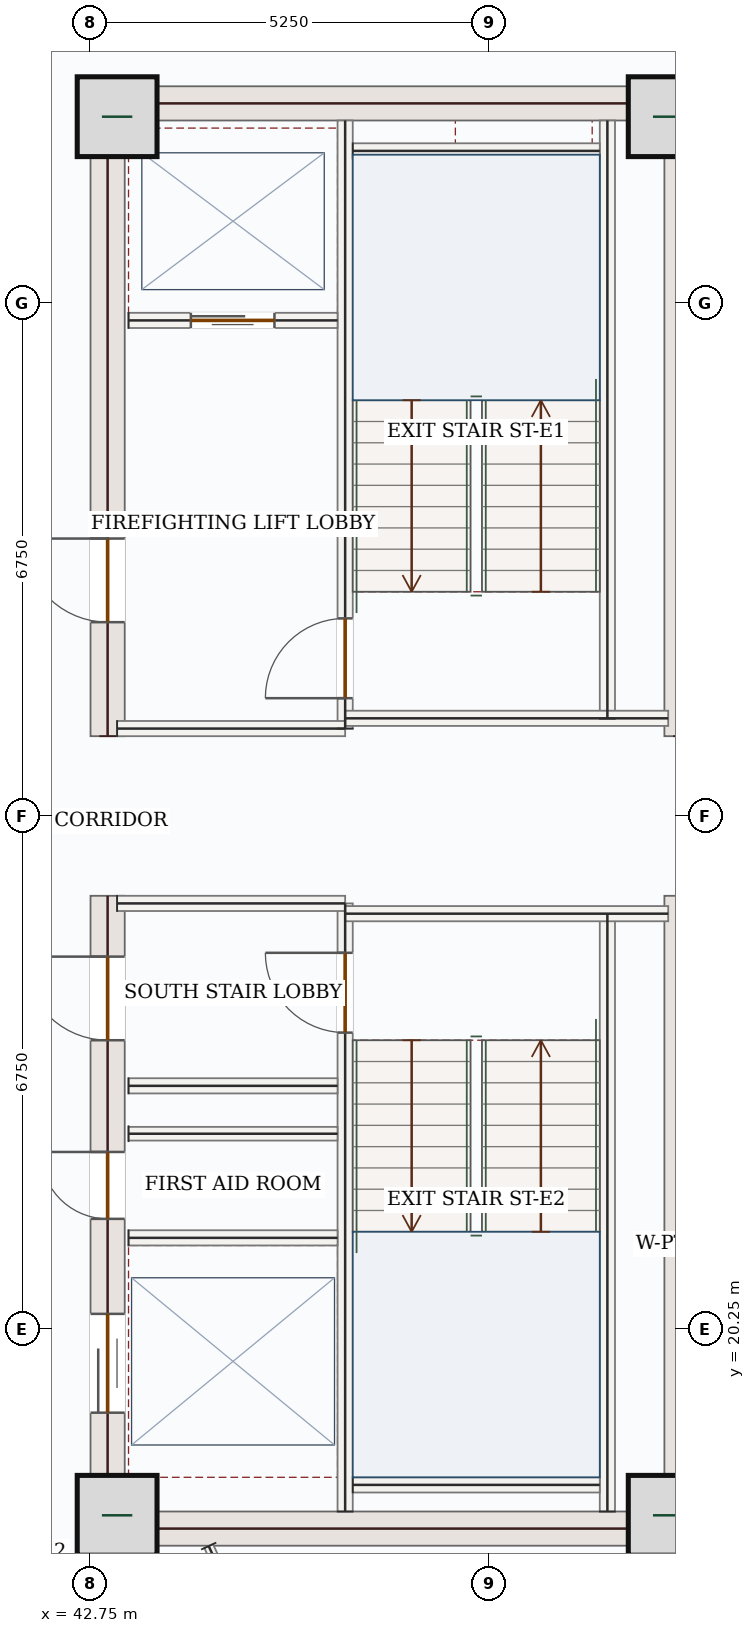
"""IFC4 building model, lengths in metres.
Left out: names, types, materials, properties, quantities, classifications, styles, units other than length and angle.
Written with IfcOpenShell. Run it as: python <this file> out.ifc"""

import sys

from ifc_helpers import new_model, si_unit, direction, frame, frame_2d, origin, origin_2d, place, context, subcontext, project, spatial, rectangle, extrude, source, transform, mapped, element, fill, save


model = new_model("IFC4")
c1 = context("Model", 3, precision=1e-05, world=origin(), true_north=direction((0.0, 1.0)))
c2 = subcontext(c1, "Body", "Model", "MODEL_VIEW")
j1 = project(units=[si_unit("LENGTHUNIT", "METRE"), si_unit("PLANEANGLEUNIT", "RADIAN")], contexts=[c1])
p1 = place(None, origin())
s1 = spatial("IfcSite", under=j1, at=p1, CompositionType="ELEMENT")
p2 = place(p1, origin())
s2 = spatial("IfcBuilding", under=s1, at=p2, CompositionType="ELEMENT")
p3 = place(p2, frame((0.0, 0.0, 239.1)))
s3 = spatial("IfcBuildingStorey", under=s2, at=p3, CompositionType="ELEMENT", Elevation=239.1)
p4 = place(p3, frame((42.975, 17.4, 0.0), z_axis=(0.0, 0.0, 1.0), x_axis=(0.0, 1.0, 0.0)))
e1 = element("IfcWall", 1, at=p4, inside=s3, PredefinedType="SHEAR", context=c2, shape_type="SweptSolid", body=[
    extrude(rectangle(XDim=8.55, YDim=0.45, at=frame_2d((4.275, 0.0))), origin(), (0.0, 0.0, 1.0), 3.5),
])
p5 = place(p4, frame((6.65, 0.0, 0.0)))
e2 = element("IfcOpeningElement", 2, at=p5, cuts=e1, PredefinedType="OPENING", context=c2, shape_type="SweptSolid", body=[
    extrude(rectangle(XDim=1.1, YDim=2.2, at=frame_2d((0.55, 1.1))), frame((0.0, 0.235, 0.0), z_axis=(0.0, -1.0, 0.0), x_axis=(1.0, 0.0, 0.0)), (0.0, 0.0, 1.0), 0.47),
])
p6 = place(p4, frame((1.75, 0.0, 0.0)))
e3 = element("IfcOpeningElement", 3, at=p6, cuts=e1, PredefinedType="OPENING", context=c2, shape_type="SweptSolid", body=[
    extrude(rectangle(XDim=1.3, YDim=2.2, at=frame_2d((0.65, 1.1))), frame((0.0, 0.235, 0.0), z_axis=(0.0, -1.0, 0.0), x_axis=(1.0, 0.0, 0.0)), (0.0, 0.0, 1.0), 0.47),
])
p7 = place(p4, frame((4.3, 0.0, 0.0)))
e4 = element("IfcOpeningElement", 4, at=p7, cuts=e1, PredefinedType="OPENING", context=c2, shape_type="SweptSolid", body=[
    extrude(rectangle(XDim=0.88, YDim=2.1, at=frame_2d((0.44, 1.05))), frame((0.0, 0.235, 0.0), z_axis=(0.0, -1.0, 0.0), x_axis=(1.0, 0.0, 0.0)), (0.0, 0.0, 1.0), 0.47),
])
p8 = place(p3, frame((42.975, 28.05, 0.0), z_axis=(0.0, 0.0, 1.0), x_axis=(0.0, 1.0, 0.0)))
e5 = element("IfcWall", 5, at=p8, inside=s3, PredefinedType="SHEAR", context=c2, shape_type="SweptSolid", body=[
    extrude(rectangle(XDim=8.55, YDim=0.45, at=frame_2d((4.275, 0.0))), origin(), (0.0, 0.0, 1.0), 3.5),
])
p9 = place(p8, frame((1.5, 0.0, 0.0)))
e6 = element("IfcOpeningElement", 6, at=p9, cuts=e5, PredefinedType="OPENING", context=c2, shape_type="SweptSolid", body=[
    extrude(rectangle(XDim=1.1, YDim=2.2, at=frame_2d((0.55, 1.1))), frame((0.0, 0.235, 0.0), z_axis=(0.0, -1.0, 0.0), x_axis=(1.0, 0.0, 0.0)), (0.0, 0.0, 1.0), 0.47),
])
m1 = source(origin(), c2, "Body", "SweptSolid", [
    extrude(rectangle(XDim=8.55, YDim=0.45, at=frame_2d((4.275, 0.0))), origin(), (0.0, 0.0, 1.0), 3.5),
])
for number, where, z_axis, x_axis in (
    (7, (50.525, 17.4, 0.0), (0.0, 0.0, 1.0), (0.0, 1.0, 0.0)),
    (8, (50.525, 28.05, 0.0), (0.0, 0.0, 1.0), (0.0, 1.0, 0.0)),
):
    element("IfcWall", number, at=place(p3, frame(where, z_axis=z_axis, x_axis=x_axis)), inside=s3, PredefinedType="SHEAR", context=c2, shape_type="MappedRepresentation", body=[
        mapped(m1, transform((0.0, 0.0, 0.0), x_axis=(1.0, 0.0, 0.0), y_axis=(0.0, 1.0, 0.0), z_axis=(0.0, 0.0, 1.0), scale=1.0)),
    ])
m2 = source(origin(), c2, "Body", "SweptSolid", [
    extrude(rectangle(XDim=7.1, YDim=0.45, at=frame_2d((3.55, 0.0))), origin(), (0.0, 0.0, 1.0), 3.5),
])
for number, where, z_axis, x_axis in (
    (9, (43.2, 17.625, 0.0), (0.0, 0.0, 1.0), (1.0, 0.0, 0.0)),
    (10, (43.2, 36.375, 0.0), (0.0, 0.0, 1.0), (1.0, 0.0, 0.0)),
):
    element("IfcWall", number, at=place(p3, frame(where, z_axis=z_axis, x_axis=x_axis)), inside=s3, PredefinedType="SHEAR", context=c2, shape_type="MappedRepresentation", body=[
        mapped(m2, transform((0.0, 0.0, 0.0), x_axis=(1.0, 0.0, 0.0), y_axis=(0.0, 1.0, 0.0), z_axis=(0.0, 0.0, 1.0), scale=1.0)),
    ])
m3 = source(origin(), c2, "Body", "SweptSolid", [
    extrude(rectangle(XDim=1.05, YDim=1.05, at=origin_2d()), origin(), (0.0, 0.0, 1.0), 3.75),
])
for number, where, z_axis, x_axis in (
    (11, (43.1, 17.8, 0.0), (0.0, 0.0, 1.0), (1.0, 0.0, 0.0)),
    (12, (50.35, 17.8, 0.0), (0.0, 0.0, 1.0), (1.0, 0.0, 0.0)),
    (13, (43.1, 36.2, 0.0), (0.0, 0.0, 1.0), (1.0, 0.0, 0.0)),
    (14, (50.35, 36.2, 0.0), (0.0, 0.0, 1.0), (1.0, 0.0, 0.0)),
):
    element("IfcColumn", number, at=place(p3, frame(where, z_axis=z_axis, x_axis=x_axis)), inside=s3, PredefinedType="COLUMN", context=c2, shape_type="MappedRepresentation", body=[
        mapped(m3, transform((0.0, 0.0, 0.0), x_axis=(1.0, 0.0, 0.0), y_axis=(0.0, 1.0, 0.0), z_axis=(0.0, 0.0, 1.0), scale=1.0)),
    ])
p10 = place(p3, frame((53.06, 18.458, 0.0), z_axis=(0.0, 0.0, 1.0), x_axis=(-0.707106781187, -0.707106781187, 0.0)))
e15 = element("IfcWall", 15, at=p10, inside=s3, PredefinedType="SOLIDWALL", context=c2, shape_type="SweptSolid", body=[
    extrude(rectangle(XDim=5.258, YDim=0.28, at=frame_2d((2.629, 0.0))), origin(), (0.0, 0.0, 1.0), 3.5),
])
p11 = place(p10, frame((1.879, 0.0, 0.85)))
e16 = element("IfcOpeningElement", 16, at=p11, cuts=e15, PredefinedType="OPENING", context=c2, shape_type="SweptSolid", body=[
    extrude(rectangle(XDim=1.5, YDim=1.5, at=frame_2d((0.75, 0.75))), frame((0.0, 0.15, 0.0), z_axis=(0.0, -1.0, 0.0), x_axis=(1.0, 0.0, 0.0)), (0.0, 0.0, 1.0), 0.3),
])
m4 = source(origin(), c2, "Body", "SweptSolid", [
    extrude(rectangle(XDim=7.87, YDim=0.2, at=frame_2d((3.935, 0.0))), origin(), (0.0, 0.0, 1.0), 3.5),
])
for number, where, z_axis, x_axis in (
    (17, (49.55, 17.85, 0.0), (0.0, 0.0, 1.0), (0.0, 1.0, 0.0)),
    (18, (49.55, 28.28, 0.0), (0.0, 0.0, 1.0), (0.0, 1.0, 0.0)),
):
    element("IfcWall", number, at=place(p3, frame(where, z_axis=z_axis, x_axis=x_axis)), inside=s3, PredefinedType="SOLIDWALL", context=c2, shape_type="MappedRepresentation", body=[
        mapped(m4, transform((0.0, 0.0, 0.0), x_axis=(1.0, 0.0, 0.0), y_axis=(0.0, 1.0, 0.0), z_axis=(0.0, 0.0, 1.0), scale=1.0)),
    ])
p12 = place(p3, frame((46.1, 17.85, 0.0), z_axis=(0.0, 0.0, 1.0), x_axis=(0.0, 1.0, 0.0)))
e19 = element("IfcWall", 19, at=p12, inside=s3, PredefinedType="SOLIDWALL", context=c2, shape_type="SweptSolid", body=[
    extrude(rectangle(XDim=8.0, YDim=0.2, at=frame_2d((4.0, 0.0))), origin(), (0.0, 0.0, 1.0), 3.5),
])
p13 = place(p12, frame((6.3, 0.0, 0.0)))
e20 = element("IfcOpeningElement", 20, at=p13, cuts=e19, PredefinedType="OPENING", context=c2, shape_type="SweptSolid", body=[
    extrude(rectangle(XDim=1.05, YDim=2.15, at=frame_2d((0.525, 1.075))), frame((0.0, 0.11, 0.0), z_axis=(0.0, -1.0, 0.0), x_axis=(1.0, 0.0, 0.0)), (0.0, 0.0, 1.0), 0.22),
])
p14 = place(p3, frame((46.1, 28.15, 0.0), z_axis=(0.0, 0.0, 1.0), x_axis=(0.0, 1.0, 0.0)))
e21 = element("IfcWall", 21, at=p14, inside=s3, PredefinedType="SOLIDWALL", context=c2, shape_type="SweptSolid", body=[
    extrude(rectangle(XDim=8.0, YDim=0.2, at=frame_2d((4.0, 0.0))), origin(), (0.0, 0.0, 1.0), 3.5),
])
p15 = place(p14, frame((0.4, 0.0, 0.0)))
e22 = element("IfcOpeningElement", 22, at=p15, cuts=e21, PredefinedType="OPENING", context=c2, shape_type="SweptSolid", body=[
    extrude(rectangle(XDim=1.05, YDim=2.15, at=frame_2d((0.525, 1.075))), frame((0.0, 0.11, 0.0), z_axis=(0.0, -1.0, 0.0), x_axis=(1.0, 0.0, 0.0)), (0.0, 0.0, 1.0), 0.22),
])
m5 = source(origin(), c2, "Body", "SweptSolid", [
    extrude(rectangle(XDim=3.0, YDim=0.2, at=frame_2d((1.5, 0.0))), origin(), (0.0, 0.0, 1.0), 3.5),
])
p16 = place(p3, frame((43.1, 25.85, 0.0), z_axis=(0.0, 0.0, 1.0), x_axis=(1.0, 0.0, 0.0)))
e23 = element("IfcWall", 23, at=p16, inside=s3, PredefinedType="SOLIDWALL", context=c2, shape_type="MappedRepresentation", body=[
    mapped(m5, transform((0.0, 0.0, 0.0), x_axis=(1.0, 0.0, 0.0), y_axis=(0.0, 1.0, 0.0), z_axis=(0.0, 0.0, 1.0), scale=1.0)),
])
m6 = source(origin(), c2, "Body", "SweptSolid", [
    extrude(rectangle(XDim=4.25, YDim=0.2, at=frame_2d((2.125, 0.0))), origin(), (0.0, 0.0, 1.0), 3.5),
])
p17 = place(p3, frame((46.1, 25.715, 0.0), z_axis=(0.0, 0.0, 1.0), x_axis=(1.0, 0.0, 0.0)))
e24 = element("IfcWall", 24, at=p17, inside=s3, PredefinedType="SOLIDWALL", context=c2, shape_type="MappedRepresentation", body=[
    mapped(m6, transform((0.0, 0.0, 0.0), x_axis=(1.0, 0.0, 0.0), y_axis=(0.0, 1.0, 0.0), z_axis=(0.0, 0.0, 1.0), scale=1.0)),
])
p18 = place(p3, frame((43.1, 28.15, 0.0), z_axis=(0.0, 0.0, 1.0), x_axis=(1.0, 0.0, 0.0)))
e25 = element("IfcWall", 25, at=p18, inside=s3, PredefinedType="SOLIDWALL", context=c2, shape_type="MappedRepresentation", body=[
    mapped(m5, transform((0.0, 0.0, 0.0), x_axis=(1.0, 0.0, 0.0), y_axis=(0.0, 1.0, 0.0), z_axis=(0.0, 0.0, 1.0), scale=1.0)),
])
p19 = place(p3, frame((46.1, 28.285, 0.0), z_axis=(0.0, 0.0, 1.0), x_axis=(1.0, 0.0, 0.0)))
e26 = element("IfcWall", 26, at=p19, inside=s3, PredefinedType="SOLIDWALL", context=c2, shape_type="MappedRepresentation", body=[
    mapped(m6, transform((0.0, 0.0, 0.0), x_axis=(1.0, 0.0, 0.0), y_axis=(0.0, 1.0, 0.0), z_axis=(0.0, 0.0, 1.0), scale=1.0)),
])
m7 = source(origin(), c2, "Body", "SweptSolid", [
    extrude(rectangle(XDim=3.25, YDim=0.2, at=frame_2d((1.625, 0.0))), origin(), (0.0, 0.0, 1.0), 3.5),
])
for number, where, z_axis, x_axis in (
    (27, (46.2, 35.75, 0.0), (0.0, 0.0, 1.0), (1.0, 0.0, 0.0)),
    (28, (46.2, 18.2, 0.0), (0.0, 0.0, 1.0), (1.0, 0.0, 0.0)),
):
    element("IfcWall", number, at=place(p3, frame(where, z_axis=z_axis, x_axis=x_axis)), inside=s3, PredefinedType="SOLIDWALL", context=c2, shape_type="MappedRepresentation", body=[
        mapped(m7, transform((0.0, 0.0, 0.0), x_axis=(1.0, 0.0, 0.0), y_axis=(0.0, 1.0, 0.0), z_axis=(0.0, 0.0, 1.0), scale=1.0)),
    ])
p20 = place(p3, frame((43.25, 33.52, 0.0), z_axis=(0.0, 0.0, 1.0), x_axis=(1.0, 0.0, 0.0)))
e29 = element("IfcWall", 29, at=p20, inside=s3, PredefinedType="SOLIDWALL", context=c2, shape_type="SweptSolid", body=[
    extrude(rectangle(XDim=2.75, YDim=0.2, at=frame_2d((1.375, 0.0))), origin(), (0.0, 0.0, 1.0), 3.5),
])
p21 = place(p20, frame((0.82, 0.0, 0.0)))
e30 = element("IfcOpeningElement", 30, at=p21, cuts=e29, PredefinedType="OPENING", context=c2, shape_type="SweptSolid", body=[
    extrude(rectangle(XDim=1.1, YDim=2.15, at=frame_2d((0.55, 1.075))), frame((0.0, 0.11, 0.0), z_axis=(0.0, -1.0, 0.0), x_axis=(1.0, 0.0, 0.0)), (0.0, 0.0, 1.0), 0.22),
])
m8 = source(origin(), c2, "Body", "SweptSolid", [
    extrude(rectangle(XDim=2.75, YDim=0.2, at=frame_2d((1.375, 0.0))), origin(), (0.0, 0.0, 1.0), 3.5),
])
for number, where, z_axis, x_axis in (
    (31, (43.25, 23.45, 0.0), (0.0, 0.0, 1.0), (1.0, 0.0, 0.0)),
    (32, (43.25, 21.45, 0.0), (0.0, 0.0, 1.0), (1.0, 0.0, 0.0)),
):
    element("IfcWall", number, at=place(p3, frame(where, z_axis=z_axis, x_axis=x_axis)), inside=s3, PredefinedType="SOLIDWALL", context=c2, shape_type="MappedRepresentation", body=[
        mapped(m8, transform((0.0, 0.0, 0.0), x_axis=(1.0, 0.0, 0.0), y_axis=(0.0, 1.0, 0.0), z_axis=(0.0, 0.0, 1.0), scale=1.0)),
    ])
m9 = source(origin(), c2, "Body", "SweptSolid", [
    extrude(rectangle(XDim=2.75, YDim=0.18, at=frame_2d((1.375, 0.0))), origin(), (0.0, 0.0, 1.0), 3.5),
])
p22 = place(p3, frame((43.25, 22.82, 0.0), z_axis=(0.0, 0.0, 1.0), x_axis=(1.0, 0.0, 0.0)))
e33 = element("IfcWall", 33, at=p22, inside=s3, PredefinedType="PARTITIONING", context=c2, shape_type="MappedRepresentation", body=[
    mapped(m9, transform((0.0, 0.0, 0.0), x_axis=(1.0, 0.0, 0.0), y_axis=(0.0, 1.0, 0.0), z_axis=(0.0, 0.0, 1.0), scale=1.0)),
])
m10 = source(origin(), c2, "Body", "SweptSolid", [
    extrude(rectangle(XDim=8.712, YDim=0.125, at=frame_2d((4.356, 0.0))), origin(), (0.0, 0.0, 1.0), 3.5),
])
p23 = place(p3, frame((44.305, 17.395, 0.0), z_axis=(0.0, 0.0, 1.0), x_axis=(0.419438424399, -0.907783789312, 0.0)))
e34 = element("IfcWall", 34, at=p23, inside=s3, PredefinedType="PARTITIONING", context=c2, shape_type="MappedRepresentation", body=[
    mapped(m10, transform((0.0, 0.0, 0.0), x_axis=(1.0, 0.0, 0.0), y_axis=(0.0, 1.0, 0.0), z_axis=(0.0, 0.0, 1.0), scale=1.0)),
])
m11 = source(origin(), c2, "Body", "SweptSolid", [
    extrude(rectangle(XDim=1.05, YDim=2.15, at=frame_2d((0.525, 1.075))), frame((0.0, 0.025, 0.0), z_axis=(0.0, -1.0, 0.0), x_axis=(1.0, 0.0, 0.0)), (0.0, 0.0, 1.0), 0.05),
])
p24 = place(p15, origin())
e35 = element("IfcDoor", 35, at=p24, inside=s3, OperationType="SINGLE_SWING_LEFT", PredefinedType="DOOR", context=c2, shape_type="MappedRepresentation", body=[
    mapped(m11, transform((0.0, 0.0, 0.0), x_axis=(1.0, 0.0, 0.0), y_axis=(0.0, 1.0, 0.0), z_axis=(0.0, 0.0, 1.0), scale=1.0)),
])
fill(e22, e35)
p25 = place(p13, origin())
e36 = element("IfcDoor", 36, at=p25, inside=s3, OperationType="SINGLE_SWING_RIGHT", PredefinedType="DOOR", context=c2, shape_type="MappedRepresentation", body=[
    mapped(m11, transform((0.0, 0.0, 0.0), x_axis=(1.0, 0.0, 0.0), y_axis=(0.0, 1.0, 0.0), z_axis=(0.0, 0.0, 1.0), scale=1.0)),
])
fill(e20, e36)
m12 = source(origin(), c2, "Body", "SweptSolid", [
    extrude(rectangle(XDim=1.1, YDim=2.15, at=frame_2d((0.55, 1.075))), frame((0.0, 0.025, 0.0), z_axis=(0.0, -1.0, 0.0), x_axis=(1.0, 0.0, 0.0)), (0.0, 0.0, 1.0), 0.05),
])
p26 = place(p21, origin())
e37 = element("IfcDoor", 37, at=p26, inside=s3, OperationType="DOUBLE_DOOR_SLIDING", PredefinedType="DOOR", context=c2, shape_type="MappedRepresentation", body=[
    mapped(m12, transform((0.0, 0.0, 0.0), x_axis=(1.0, 0.0, 0.0), y_axis=(0.0, 1.0, 0.0), z_axis=(0.0, 0.0, 1.0), scale=1.0)),
])
fill(e30, e37)
m13 = source(origin(), c2, "Body", "SweptSolid", [
    extrude(rectangle(XDim=1.1, YDim=2.2, at=frame_2d((0.55, 1.1))), frame((0.0, 0.025, 0.0), z_axis=(0.0, -1.0, 0.0), x_axis=(1.0, 0.0, 0.0)), (0.0, 0.0, 1.0), 0.05),
])
p27 = place(p9, origin())
e38 = element("IfcDoor", 38, at=p27, inside=s3, OperationType="SINGLE_SWING_RIGHT", PredefinedType="DOOR", context=c2, shape_type="MappedRepresentation", body=[
    mapped(m13, transform((0.0, 0.0, 0.0), x_axis=(1.0, 0.0, 0.0), y_axis=(0.0, 1.0, 0.0), z_axis=(0.0, 0.0, 1.0), scale=1.0)),
])
fill(e6, e38)
p28 = place(p5, origin())
e39 = element("IfcDoor", 39, at=p28, inside=s3, OperationType="SINGLE_SWING_RIGHT", PredefinedType="DOOR", context=c2, shape_type="MappedRepresentation", body=[
    mapped(m13, transform((0.0, 0.0, 0.0), x_axis=(1.0, 0.0, 0.0), y_axis=(0.0, 1.0, 0.0), z_axis=(0.0, 0.0, 1.0), scale=1.0)),
])
fill(e2, e39)
m14 = source(origin(), c2, "Body", "SweptSolid", [
    extrude(rectangle(XDim=1.3, YDim=2.2, at=frame_2d((0.65, 1.1))), frame((0.0, 0.025, 0.0), z_axis=(0.0, -1.0, 0.0), x_axis=(1.0, 0.0, 0.0)), (0.0, 0.0, 1.0), 0.05),
])
p29 = place(p6, origin())
e40 = element("IfcDoor", 40, at=p29, inside=s3, OperationType="DOUBLE_DOOR_SLIDING", PredefinedType="DOOR", context=c2, shape_type="MappedRepresentation", body=[
    mapped(m14, transform((0.0, 0.0, 0.0), x_axis=(1.0, 0.0, 0.0), y_axis=(0.0, 1.0, 0.0), z_axis=(0.0, 0.0, 1.0), scale=1.0)),
])
fill(e3, e40)
m15 = source(origin(), c2, "Body", "SweptSolid", [
    extrude(rectangle(XDim=0.88, YDim=2.1, at=frame_2d((0.44, 1.05))), frame((0.0, 0.025, 0.0), z_axis=(0.0, -1.0, 0.0), x_axis=(1.0, 0.0, 0.0)), (0.0, 0.0, 1.0), 0.05),
])
p30 = place(p7, origin())
e41 = element("IfcDoor", 41, at=p30, inside=s3, OperationType="SINGLE_SWING_RIGHT", PredefinedType="DOOR", context=c2, shape_type="MappedRepresentation", body=[
    mapped(m15, transform((0.0, 0.0, 0.0), x_axis=(1.0, 0.0, 0.0), y_axis=(0.0, 1.0, 0.0), z_axis=(0.0, 0.0, 1.0), scale=1.0)),
])
fill(e4, e41)
save(model, sys.argv[1])
